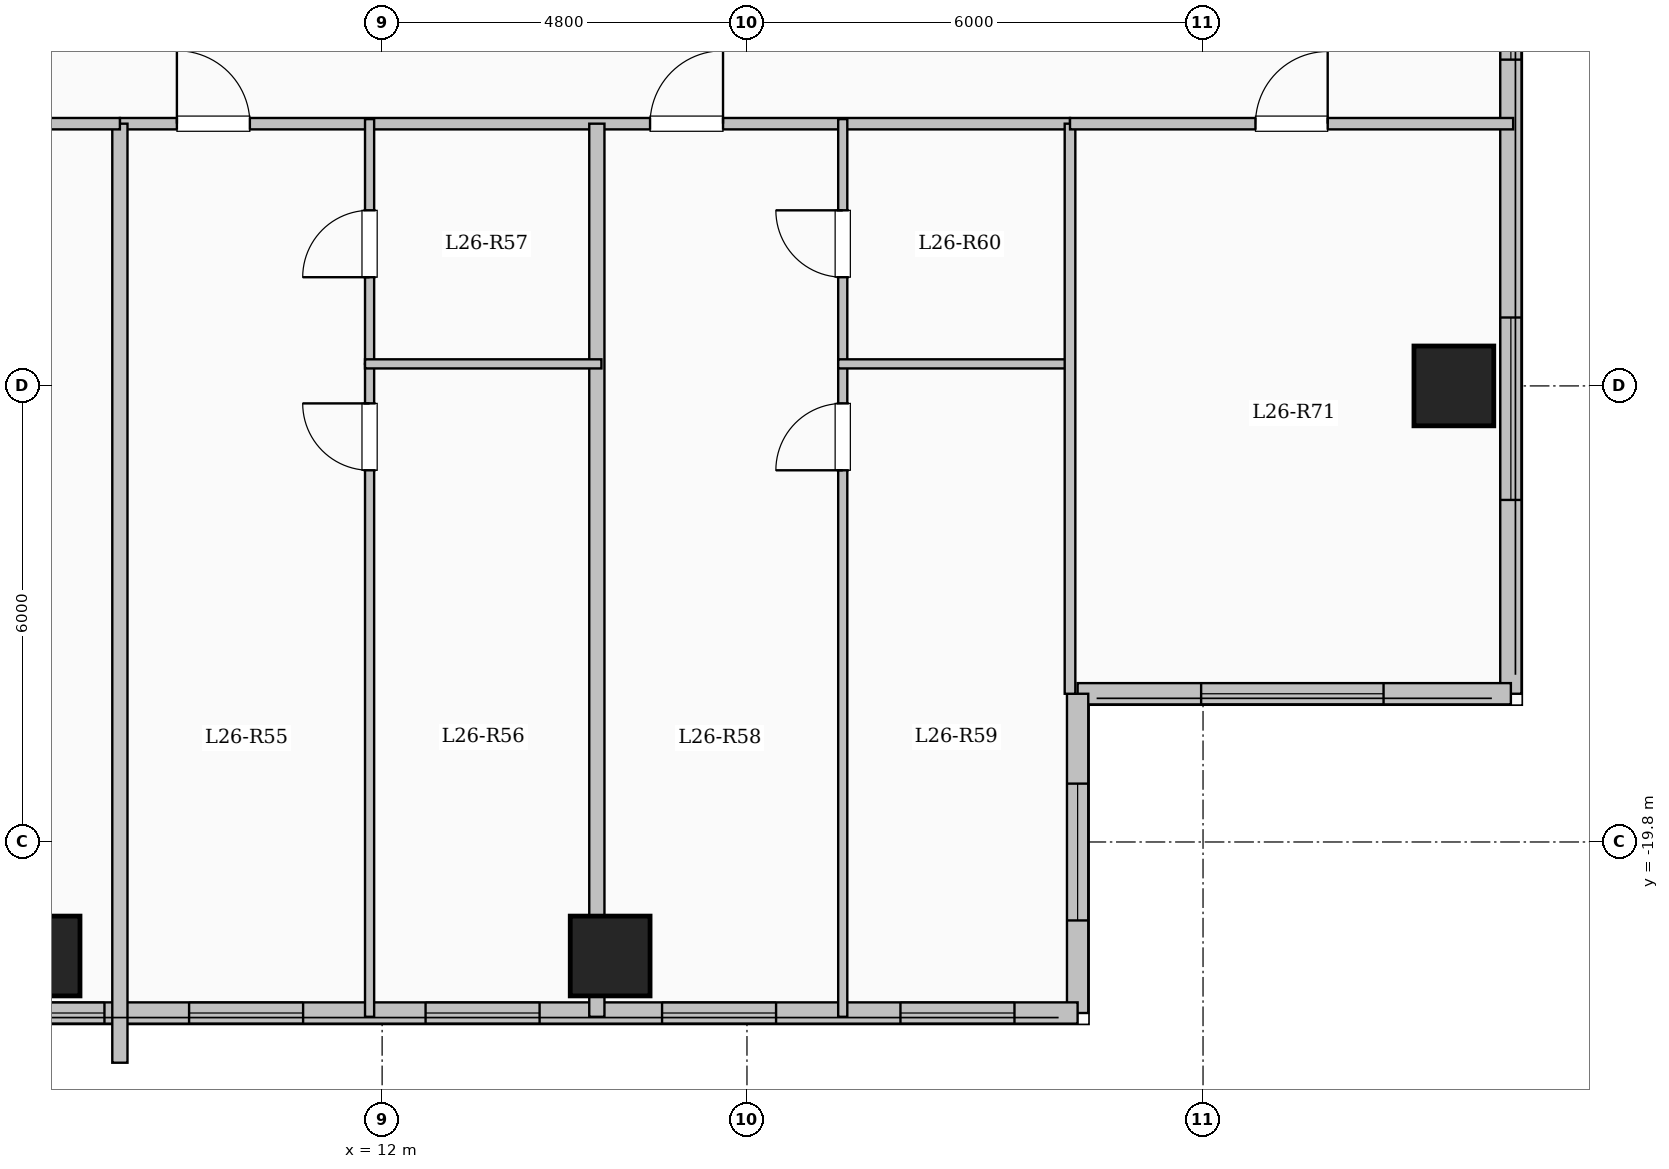
"""IFC4 building model, lengths in metres.
Left out: names, types, materials, properties, quantities, classifications, styles, units other than length and angle.
Written with IfcOpenShell. Run it as: python <this file> out.ifc"""

import sys

from ifc_helpers import new_model, si_unit, direction, frame, frame_2d, origin, origin_2d, place, context, subcontext, project, spatial, rectangle, extrude, element, fill, save


model = new_model("IFC4")
c1 = context("Model", 3, precision=1e-05, world=origin(), true_north=direction((0.0, 1.0)))
c2 = subcontext(c1, "Body", "Model", "MODEL_VIEW")
j1 = project(units=[si_unit("LENGTHUNIT", "METRE"), si_unit("PLANEANGLEUNIT", "RADIAN")], contexts=[c1])
p1 = place(None, origin())
s1 = spatial("IfcSite", under=j1, at=p1, CompositionType="ELEMENT")
p2 = place(p1, origin())
s2 = spatial("IfcBuilding", under=s1, at=p2, CompositionType="ELEMENT")
p3 = place(p2, frame((0.0, 0.0, 98.4)))
s3 = spatial("IfcBuildingStorey", under=s2, at=p3, CompositionType="ELEMENT", Elevation=98.4)
for number, where, z_axis, x_axis in (
    (1, (7.5, -21.3, 0.0), (0.0, 0.0, 1.0), (1.0, 0.0, 0.0)),
    (2, (15.0, -21.3, 0.0), (0.0, 0.0, 1.0), (1.0, 0.0, 0.0)),
    (3, (26.1, -13.8, 0.0), (0.0, 0.0, 1.0), (1.0, 0.0, 0.0)),
):
    element("IfcColumn", number, at=place(p3, frame(where, z_axis=z_axis, x_axis=x_axis)), inside=s3, PredefinedType="COLUMN", context=c2, shape_type="SweptSolid", body=[
        extrude(rectangle(XDim=1.05, YDim=1.05, at=origin_2d()), origin(), (0.0, 0.0, 1.0), 3.35),
    ])
p4 = place(p3, frame((26.85, 17.85, 0.0), z_axis=(0.0, 0.0, 1.0), x_axis=(0.0, -1.0, 0.0)))
e4 = element("IfcWall", 4, at=p4, inside=s3, PredefinedType="SOLIDWALL", context=c2, shape_type="SweptSolid", body=[
    extrude(rectangle(XDim=35.7, YDim=0.28, at=frame_2d((17.85, 0.0))), origin(), (0.0, 0.0, 1.0), 3.1),
])
p5 = place(p4, frame((1.675, 0.0, 0.9)))
e5 = element("IfcOpeningElement", 5, at=p5, cuts=e4, PredefinedType="OPENING", context=c2, shape_type="SweptSolid", body=[
    extrude(rectangle(XDim=2.0, YDim=1.7, at=frame_2d((1.0, 0.85))), frame((0.0, 0.15, 0.0), z_axis=(0.0, -1.0, 0.0), x_axis=(1.0, 0.0, 0.0)), (0.0, 0.0, 1.0), 0.3),
])
p6 = place(p4, frame((5.725, 0.0, 0.95)))
e6 = element("IfcOpeningElement", 6, at=p6, cuts=e4, PredefinedType="OPENING", context=c2, shape_type="SweptSolid", body=[
    extrude(rectangle(XDim=1.0, YDim=1.5, at=frame_2d((0.5, 0.75))), frame((0.0, 0.15, 0.0), z_axis=(0.0, -1.0, 0.0), x_axis=(1.0, 0.0, 0.0)), (0.0, 0.0, 1.0), 0.3),
])
p7 = place(p4, frame((15.1, 0.0, 0.9)))
e7 = element("IfcOpeningElement", 7, at=p7, cuts=e4, PredefinedType="OPENING", context=c2, shape_type="SweptSolid", body=[
    extrude(rectangle(XDim=2.0, YDim=1.7, at=frame_2d((1.0, 0.85))), frame((0.0, 0.15, 0.0), z_axis=(0.0, -1.0, 0.0), x_axis=(1.0, 0.0, 0.0)), (0.0, 0.0, 1.0), 0.3),
])
p8 = place(p4, frame((25.857, 0.0, 0.9)))
e8 = element("IfcOpeningElement", 8, at=p8, cuts=e4, PredefinedType="OPENING", context=c2, shape_type="SweptSolid", body=[
    extrude(rectangle(XDim=1.5, YDim=1.65, at=frame_2d((0.75, 0.825))), frame((0.0, 0.15, 0.0), z_axis=(0.0, -1.0, 0.0), x_axis=(1.0, 0.0, 0.0)), (0.0, 0.0, 1.0), 0.3),
])
p9 = place(p4, frame((30.75, 0.0, 0.9)))
e9 = element("IfcOpeningElement", 9, at=p9, cuts=e4, PredefinedType="OPENING", context=c2, shape_type="SweptSolid", body=[
    extrude(rectangle(XDim=2.4, YDim=1.8, at=frame_2d((1.2, 0.9))), frame((0.0, 0.15, 0.0), z_axis=(0.0, -1.0, 0.0), x_axis=(1.0, 0.0, 0.0)), (0.0, 0.0, 1.0), 0.3),
])
p10 = place(p3, frame((26.85, -17.85, 0.0), z_axis=(0.0, 0.0, 1.0), x_axis=(-1.0, 0.0, 0.0)))
e10 = element("IfcWall", 10, at=p10, inside=s3, PredefinedType="SOLIDWALL", context=c2, shape_type="SweptSolid", body=[
    extrude(rectangle(XDim=5.7, YDim=0.28, at=frame_2d((2.85, 0.0))), origin(), (0.0, 0.0, 1.0), 3.1),
])
p11 = place(p10, frame((1.675, 0.0, 0.9)))
e11 = element("IfcOpeningElement", 11, at=p11, cuts=e10, PredefinedType="OPENING", context=c2, shape_type="SweptSolid", body=[
    extrude(rectangle(XDim=2.4, YDim=1.8, at=frame_2d((1.2, 0.9))), frame((0.0, 0.15, 0.0), z_axis=(0.0, -1.0, 0.0), x_axis=(1.0, 0.0, 0.0)), (0.0, 0.0, 1.0), 0.3),
])
p12 = place(p3, frame((21.15, -17.85, 0.0), z_axis=(0.0, 0.0, 1.0), x_axis=(0.0, -1.0, 0.0)))
e12 = element("IfcWall", 12, at=p12, inside=s3, PredefinedType="SOLIDWALL", context=c2, shape_type="SweptSolid", body=[
    extrude(rectangle(XDim=4.2, YDim=0.28, at=frame_2d((2.1, 0.0))), origin(), (0.0, 0.0, 1.0), 3.1),
])
p13 = place(p12, frame((1.182, 0.0, 0.9)))
e13 = element("IfcOpeningElement", 13, at=p13, cuts=e12, PredefinedType="OPENING", context=c2, shape_type="SweptSolid", body=[
    extrude(rectangle(XDim=1.8, YDim=1.65, at=frame_2d((0.9, 0.825))), frame((0.0, 0.15, 0.0), z_axis=(0.0, -1.0, 0.0), x_axis=(1.0, 0.0, 0.0)), (0.0, 0.0, 1.0), 0.3),
])
p14 = place(p3, frame((21.15, -22.05, 0.0), z_axis=(0.0, 0.0, 1.0), x_axis=(-1.0, 0.0, 0.0)))
e14 = element("IfcWall", 14, at=p14, inside=s3, PredefinedType="SOLIDWALL", context=c2, shape_type="SweptSolid", body=[
    extrude(rectangle(XDim=13.8, YDim=0.28, at=frame_2d((6.9, 0.0))), origin(), (0.0, 0.0, 1.0), 3.1),
])
p15 = place(p14, frame((0.831, 0.0, 0.9)))
e15 = element("IfcOpeningElement", 15, at=p15, cuts=e14, PredefinedType="OPENING", context=c2, shape_type="SweptSolid", body=[
    extrude(rectangle(XDim=1.5, YDim=1.65, at=frame_2d((0.75, 0.825))), frame((0.0, 0.15, 0.0), z_axis=(0.0, -1.0, 0.0), x_axis=(1.0, 0.0, 0.0)), (0.0, 0.0, 1.0), 0.3),
])
p16 = place(p14, frame((3.967, 0.0, 0.9)))
e16 = element("IfcOpeningElement", 16, at=p16, cuts=e14, PredefinedType="OPENING", context=c2, shape_type="SweptSolid", body=[
    extrude(rectangle(XDim=1.5, YDim=1.65, at=frame_2d((0.75, 0.825))), frame((0.0, 0.15, 0.0), z_axis=(0.0, -1.0, 0.0), x_axis=(1.0, 0.0, 0.0)), (0.0, 0.0, 1.0), 0.3),
])
p17 = place(p14, frame((7.078, 0.0, 0.9)))
e17 = element("IfcOpeningElement", 17, at=p17, cuts=e14, PredefinedType="OPENING", context=c2, shape_type="SweptSolid", body=[
    extrude(rectangle(XDim=1.5, YDim=1.65, at=frame_2d((0.75, 0.825))), frame((0.0, 0.15, 0.0), z_axis=(0.0, -1.0, 0.0), x_axis=(1.0, 0.0, 0.0)), (0.0, 0.0, 1.0), 0.3),
])
p18 = place(p14, frame((10.19, 0.0, 0.9)))
e18 = element("IfcOpeningElement", 18, at=p18, cuts=e14, PredefinedType="OPENING", context=c2, shape_type="SweptSolid", body=[
    extrude(rectangle(XDim=1.5, YDim=1.65, at=frame_2d((0.75, 0.825))), frame((0.0, 0.15, 0.0), z_axis=(0.0, -1.0, 0.0), x_axis=(1.0, 0.0, 0.0)), (0.0, 0.0, 1.0), 0.3),
])
p19 = place(p14, frame((12.803, 0.0, 0.95)))
e19 = element("IfcOpeningElement", 19, at=p19, cuts=e14, PredefinedType="OPENING", context=c2, shape_type="SweptSolid", body=[
    extrude(rectangle(XDim=0.85, YDim=1.5, at=frame_2d((0.425, 0.75))), frame((0.0, 0.15, 0.0), z_axis=(0.0, -1.0, 0.0), x_axis=(1.0, 0.0, 0.0)), (0.0, 0.0, 1.0), 0.3),
])
p20 = place(p3, frame((8.55, -10.35, 0.0), z_axis=(0.0, 0.0, 1.0), x_axis=(1.0, 0.0, 0.0)))
e20 = element("IfcWall", 20, at=p20, inside=s3, PredefinedType="PARTITIONING", context=c2, shape_type="SweptSolid", body=[
    extrude(rectangle(XDim=12.5, YDim=0.15, at=frame_2d((6.25, 0.0))), origin(), (0.0, 0.0, 1.0), 3.1),
])
p21 = place(p20, frame((0.75, 0.0, 0.0)))
e21 = element("IfcOpeningElement", 21, at=p21, cuts=e20, PredefinedType="OPENING", context=c2, shape_type="SweptSolid", body=[
    extrude(rectangle(XDim=0.96, YDim=2.15, at=frame_2d((0.48, 1.075))), frame((0.0, 0.085, 0.0), z_axis=(0.0, -1.0, 0.0), x_axis=(1.0, 0.0, 0.0)), (0.0, 0.0, 1.0), 0.17),
])
p22 = place(p20, frame((6.975, 0.0, 0.0)))
e22 = element("IfcOpeningElement", 22, at=p22, cuts=e20, PredefinedType="OPENING", context=c2, shape_type="SweptSolid", body=[
    extrude(rectangle(XDim=0.96, YDim=2.15, at=frame_2d((0.48, 1.075))), frame((0.0, 0.085, 0.0), z_axis=(0.0, -1.0, 0.0), x_axis=(1.0, 0.0, 0.0)), (0.0, 0.0, 1.0), 0.17),
])
p23 = place(p3, frame((14.825, -22.1, 0.0), z_axis=(0.0, 0.0, 1.0), x_axis=(0.0, 1.0, 0.0)))
e23 = element("IfcWall", 23, at=p23, inside=s3, PredefinedType="SOLIDWALL", context=c2, shape_type="SweptSolid", body=[
    extrude(rectangle(XDim=11.75, YDim=0.2, at=frame_2d((5.875, 0.0))), origin(), (0.0, 0.0, 1.0), 2.435),
])
p24 = place(p3, frame((11.835, -22.1, 0.0), z_axis=(0.0, 0.0, 1.0), x_axis=(0.0, 1.0, 0.0)))
e24 = element("IfcWall", 24, at=p24, inside=s3, PredefinedType="PARTITIONING", context=c2, shape_type="SweptSolid", body=[
    extrude(rectangle(XDim=8.59, YDim=0.12, at=frame_2d((4.295, 0.0))), origin(), (0.0, 0.0, 1.0), 3.1),
])
p25 = place(p24, frame((7.19, 0.0, 0.0)))
e25 = element("IfcOpeningElement", 25, at=p25, cuts=e24, PredefinedType="OPENING", context=c2, shape_type="SweptSolid", body=[
    extrude(rectangle(XDim=0.88, YDim=2.1, at=frame_2d((0.44, 1.05))), frame((0.0, 0.07, 0.0), z_axis=(0.0, -1.0, 0.0), x_axis=(1.0, 0.0, 0.0)), (0.0, 0.0, 1.0), 0.14),
])
p26 = place(p3, frame((11.835, -13.51, 0.0), z_axis=(0.0, 0.0, 1.0), x_axis=(0.0, 1.0, 0.0)))
e26 = element("IfcWall", 26, at=p26, inside=s3, PredefinedType="PARTITIONING", context=c2, shape_type="SweptSolid", body=[
    extrude(rectangle(XDim=3.22, YDim=0.12, at=frame_2d((1.61, 0.0))), origin(), (0.0, 0.0, 1.0), 3.1),
])
p27 = place(p26, frame((1.14, 0.0, 0.0)))
e27 = element("IfcOpeningElement", 27, at=p27, cuts=e26, PredefinedType="OPENING", context=c2, shape_type="SweptSolid", body=[
    extrude(rectangle(XDim=0.88, YDim=2.1, at=frame_2d((0.44, 1.05))), frame((0.0, 0.07, 0.0), z_axis=(0.0, -1.0, 0.0), x_axis=(1.0, 0.0, 0.0)), (0.0, 0.0, 1.0), 0.14),
])
p28 = place(p3, frame((11.775, -13.51, 0.0), z_axis=(0.0, 0.0, 1.0), x_axis=(1.0, 0.0, 0.0)))
e28 = element("IfcWall", 28, at=p28, inside=s3, PredefinedType="PARTITIONING", context=c2, shape_type="SweptSolid", body=[
    extrude(rectangle(XDim=3.11, YDim=0.12, at=frame_2d((1.555, 0.0))), origin(), (0.0, 0.0, 1.0), 3.1),
])
p29 = place(p3, frame((18.06, -22.1, 0.0), z_axis=(0.0, 0.0, 1.0), x_axis=(0.0, 1.0, 0.0)))
e29 = element("IfcWall", 29, at=p29, inside=s3, PredefinedType="PARTITIONING", context=c2, shape_type="SweptSolid", body=[
    extrude(rectangle(XDim=8.59, YDim=0.12, at=frame_2d((4.295, 0.0))), origin(), (0.0, 0.0, 1.0), 3.1),
])
p30 = place(p29, frame((7.19, 0.0, 0.0)))
e30 = element("IfcOpeningElement", 30, at=p30, cuts=e29, PredefinedType="OPENING", context=c2, shape_type="SweptSolid", body=[
    extrude(rectangle(XDim=0.88, YDim=2.1, at=frame_2d((0.44, 1.05))), frame((0.0, 0.07, 0.0), z_axis=(0.0, -1.0, 0.0), x_axis=(1.0, 0.0, 0.0)), (0.0, 0.0, 1.0), 0.14),
])
p31 = place(p3, frame((18.06, -13.51, 0.0), z_axis=(0.0, 0.0, 1.0), x_axis=(0.0, 1.0, 0.0)))
e31 = element("IfcWall", 31, at=p31, inside=s3, PredefinedType="PARTITIONING", context=c2, shape_type="SweptSolid", body=[
    extrude(rectangle(XDim=3.22, YDim=0.12, at=frame_2d((1.61, 0.0))), origin(), (0.0, 0.0, 1.0), 3.1),
])
p32 = place(p31, frame((1.14, 0.0, 0.0)))
e32 = element("IfcOpeningElement", 32, at=p32, cuts=e31, PredefinedType="OPENING", context=c2, shape_type="SweptSolid", body=[
    extrude(rectangle(XDim=0.88, YDim=2.1, at=frame_2d((0.44, 1.05))), frame((0.0, 0.07, 0.0), z_axis=(0.0, -1.0, 0.0), x_axis=(1.0, 0.0, 0.0)), (0.0, 0.0, 1.0), 0.14),
])
p33 = place(p3, frame((18.0, -13.51, 0.0), z_axis=(0.0, 0.0, 1.0), x_axis=(1.0, 0.0, 0.0)))
e33 = element("IfcWall", 33, at=p33, inside=s3, PredefinedType="PARTITIONING", context=c2, shape_type="SweptSolid", body=[
    extrude(rectangle(XDim=3.11, YDim=0.12, at=frame_2d((1.555, 0.0))), origin(), (0.0, 0.0, 1.0), 3.1),
])
p34 = place(p3, frame((8.55, -22.704, 0.0), z_axis=(0.0, 0.0, 1.0), x_axis=(0.0, 1.0, 0.0)))
e34 = element("IfcWall", 34, at=p34, inside=s3, PredefinedType="SOLIDWALL", context=c2, shape_type="SweptSolid", body=[
    extrude(rectangle(XDim=12.354, YDim=0.2, at=frame_2d((6.177, 0.0))), origin(), (0.0, 0.0, 1.0), 3.1),
])
p35 = place(p3, frame((-8.55, -10.35, 0.0), z_axis=(0.0, 0.0, 1.0), x_axis=(1.0, 0.0, 0.0)))
e35 = element("IfcWall", 35, at=p35, inside=s3, PredefinedType="PARTITIONING", context=c2, shape_type="SweptSolid", body=[
    extrude(rectangle(XDim=17.1, YDim=0.15, at=frame_2d((8.55, 0.0))), origin(), (0.0, 0.0, 1.0), 3.1),
])
p36 = place(p35, frame((1.6, 0.0, 0.0)))
e36 = element("IfcOpeningElement", 36, at=p36, cuts=e35, PredefinedType="OPENING", context=c2, shape_type="SweptSolid", body=[
    extrude(rectangle(XDim=0.95, YDim=2.15, at=frame_2d((0.475, 1.075))), frame((0.0, 0.085, 0.0), z_axis=(0.0, -1.0, 0.0), x_axis=(1.0, 0.0, 0.0)), (0.0, 0.0, 1.0), 0.17),
])
p37 = place(p35, frame((10.5, 0.0, 0.0)))
e37 = element("IfcOpeningElement", 37, at=p37, cuts=e35, PredefinedType="OPENING", context=c2, shape_type="SweptSolid", body=[
    extrude(rectangle(XDim=0.95, YDim=2.15, at=frame_2d((0.475, 1.075))), frame((0.0, 0.085, 0.0), z_axis=(0.0, -1.0, 0.0), x_axis=(1.0, 0.0, 0.0)), (0.0, 0.0, 1.0), 0.17),
])
p38 = place(p3, frame((21.05, -17.85, 0.0), z_axis=(0.0, 0.0, 1.0), x_axis=(0.0, 1.0, 0.0)))
e38 = element("IfcWall", 38, at=p38, inside=s3, PredefinedType="PARTITIONING", context=c2, shape_type="SweptSolid", body=[
    extrude(rectangle(XDim=7.5, YDim=0.14, at=frame_2d((3.75, 0.0))), origin(), (0.0, 0.0, 1.0), 3.1),
])
p39 = place(p3, frame((21.05, -10.35, 0.0), z_axis=(0.0, 0.0, 1.0), x_axis=(1.0, 0.0, 0.0)))
e39 = element("IfcWall", 39, at=p39, inside=s3, PredefinedType="PARTITIONING", context=c2, shape_type="SweptSolid", body=[
    extrude(rectangle(XDim=5.83, YDim=0.15, at=frame_2d((2.915, 0.0))), origin(), (0.0, 0.0, 1.0), 3.1),
])
p40 = place(p39, frame((2.44, 0.0, 0.0)))
e40 = element("IfcOpeningElement", 40, at=p40, cuts=e39, PredefinedType="OPENING", context=c2, shape_type="SweptSolid", body=[
    extrude(rectangle(XDim=0.95, YDim=2.15, at=frame_2d((0.475, 1.075))), frame((0.0, 0.085, 0.0), z_axis=(0.0, -1.0, 0.0), x_axis=(1.0, 0.0, 0.0)), (0.0, 0.0, 1.0), 0.17),
])
p41 = place(p8, origin())
e41 = element("IfcWindow", 41, at=p41, inside=s3, PartitioningType="SINGLE_PANEL", PredefinedType="WINDOW", context=c2, shape_type="SweptSolid", body=[
    extrude(rectangle(XDim=1.5, YDim=1.65, at=frame_2d((0.75, 0.825))), frame((0.0, 0.03, 0.0), z_axis=(0.0, -1.0, 0.0), x_axis=(1.0, 0.0, 0.0)), (0.0, 0.0, 1.0), 0.06),
])
fill(e8, e41)
p42 = place(p9, origin())
e42 = element("IfcWindow", 42, at=p42, inside=s3, PartitioningType="SINGLE_PANEL", PredefinedType="WINDOW", context=c2, shape_type="SweptSolid", body=[
    extrude(rectangle(XDim=2.4, YDim=1.8, at=frame_2d((1.2, 0.9))), frame((0.0, 0.03, 0.0), z_axis=(0.0, -1.0, 0.0), x_axis=(1.0, 0.0, 0.0)), (0.0, 0.0, 1.0), 0.06),
])
fill(e9, e42)
p43 = place(p11, origin())
e43 = element("IfcWindow", 43, at=p43, inside=s3, PartitioningType="SINGLE_PANEL", PredefinedType="WINDOW", context=c2, shape_type="SweptSolid", body=[
    extrude(rectangle(XDim=2.4, YDim=1.8, at=frame_2d((1.2, 0.9))), frame((0.0, 0.03, 0.0), z_axis=(0.0, -1.0, 0.0), x_axis=(1.0, 0.0, 0.0)), (0.0, 0.0, 1.0), 0.06),
])
fill(e11, e43)
p44 = place(p13, origin())
e44 = element("IfcWindow", 44, at=p44, inside=s3, PartitioningType="SINGLE_PANEL", PredefinedType="WINDOW", context=c2, shape_type="SweptSolid", body=[
    extrude(rectangle(XDim=1.8, YDim=1.65, at=frame_2d((0.9, 0.825))), frame((0.0, 0.03, 0.0), z_axis=(0.0, -1.0, 0.0), x_axis=(1.0, 0.0, 0.0)), (0.0, 0.0, 1.0), 0.06),
])
fill(e13, e44)
p45 = place(p15, origin())
e45 = element("IfcWindow", 45, at=p45, inside=s3, PartitioningType="SINGLE_PANEL", PredefinedType="WINDOW", context=c2, shape_type="SweptSolid", body=[
    extrude(rectangle(XDim=1.5, YDim=1.65, at=frame_2d((0.75, 0.825))), frame((0.0, 0.03, 0.0), z_axis=(0.0, -1.0, 0.0), x_axis=(1.0, 0.0, 0.0)), (0.0, 0.0, 1.0), 0.06),
])
fill(e15, e45)
p46 = place(p16, origin())
e46 = element("IfcWindow", 46, at=p46, inside=s3, PartitioningType="SINGLE_PANEL", PredefinedType="WINDOW", context=c2, shape_type="SweptSolid", body=[
    extrude(rectangle(XDim=1.5, YDim=1.65, at=frame_2d((0.75, 0.825))), frame((0.0, 0.03, 0.0), z_axis=(0.0, -1.0, 0.0), x_axis=(1.0, 0.0, 0.0)), (0.0, 0.0, 1.0), 0.06),
])
fill(e16, e46)
p47 = place(p17, origin())
e47 = element("IfcWindow", 47, at=p47, inside=s3, PartitioningType="SINGLE_PANEL", PredefinedType="WINDOW", context=c2, shape_type="SweptSolid", body=[
    extrude(rectangle(XDim=1.5, YDim=1.65, at=frame_2d((0.75, 0.825))), frame((0.0, 0.03, 0.0), z_axis=(0.0, -1.0, 0.0), x_axis=(1.0, 0.0, 0.0)), (0.0, 0.0, 1.0), 0.06),
])
fill(e17, e47)
p48 = place(p18, origin())
e48 = element("IfcWindow", 48, at=p48, inside=s3, PartitioningType="SINGLE_PANEL", PredefinedType="WINDOW", context=c2, shape_type="SweptSolid", body=[
    extrude(rectangle(XDim=1.5, YDim=1.65, at=frame_2d((0.75, 0.825))), frame((0.0, 0.03, 0.0), z_axis=(0.0, -1.0, 0.0), x_axis=(1.0, 0.0, 0.0)), (0.0, 0.0, 1.0), 0.06),
])
fill(e18, e48)
p49 = place(p19, origin())
e49 = element("IfcWindow", 49, at=p49, inside=s3, PartitioningType="SINGLE_PANEL", PredefinedType="WINDOW", context=c2, shape_type="SweptSolid", body=[
    extrude(rectangle(XDim=0.85, YDim=1.5, at=frame_2d((0.425, 0.75))), frame((0.0, 0.03, 0.0), z_axis=(0.0, -1.0, 0.0), x_axis=(1.0, 0.0, 0.0)), (0.0, 0.0, 1.0), 0.06),
])
fill(e19, e49)
p50 = place(p21, origin())
e50 = element("IfcDoor", 50, at=p50, inside=s3, OperationType="SINGLE_SWING_LEFT", PredefinedType="DOOR", context=c2, shape_type="SweptSolid", body=[
    extrude(rectangle(XDim=0.96, YDim=2.15, at=frame_2d((0.48, 1.075))), frame((0.0, 0.025, 0.0), z_axis=(0.0, -1.0, 0.0), x_axis=(1.0, 0.0, 0.0)), (0.0, 0.0, 1.0), 0.05),
])
fill(e21, e50)
p51 = place(p25, origin())
e51 = element("IfcDoor", 51, at=p51, inside=s3, OperationType="SINGLE_SWING_RIGHT", PredefinedType="DOOR", context=c2, shape_type="SweptSolid", body=[
    extrude(rectangle(XDim=0.88, YDim=2.1, at=frame_2d((0.44, 1.05))), frame((0.0, 0.025, 0.0), z_axis=(0.0, -1.0, 0.0), x_axis=(1.0, 0.0, 0.0)), (0.0, 0.0, 1.0), 0.05),
])
fill(e25, e51)
p52 = place(p27, origin())
e52 = element("IfcDoor", 52, at=p52, inside=s3, OperationType="SINGLE_SWING_LEFT", PredefinedType="DOOR", context=c2, shape_type="SweptSolid", body=[
    extrude(rectangle(XDim=0.88, YDim=2.1, at=frame_2d((0.44, 1.05))), frame((0.0, 0.025, 0.0), z_axis=(0.0, -1.0, 0.0), x_axis=(1.0, 0.0, 0.0)), (0.0, 0.0, 1.0), 0.05),
])
fill(e27, e52)
p53 = place(p22, origin())
e53 = element("IfcDoor", 53, at=p53, inside=s3, OperationType="SINGLE_SWING_RIGHT", PredefinedType="DOOR", context=c2, shape_type="SweptSolid", body=[
    extrude(rectangle(XDim=0.96, YDim=2.15, at=frame_2d((0.48, 1.075))), frame((0.0, 0.025, 0.0), z_axis=(0.0, -1.0, 0.0), x_axis=(1.0, 0.0, 0.0)), (0.0, 0.0, 1.0), 0.05),
])
fill(e22, e53)
p54 = place(p30, origin())
e54 = element("IfcDoor", 54, at=p54, inside=s3, OperationType="SINGLE_SWING_LEFT", PredefinedType="DOOR", context=c2, shape_type="SweptSolid", body=[
    extrude(rectangle(XDim=0.88, YDim=2.1, at=frame_2d((0.44, 1.05))), frame((0.0, 0.025, 0.0), z_axis=(0.0, -1.0, 0.0), x_axis=(1.0, 0.0, 0.0)), (0.0, 0.0, 1.0), 0.05),
])
fill(e30, e54)
p55 = place(p32, origin())
e55 = element("IfcDoor", 55, at=p55, inside=s3, OperationType="SINGLE_SWING_RIGHT", PredefinedType="DOOR", context=c2, shape_type="SweptSolid", body=[
    extrude(rectangle(XDim=0.88, YDim=2.1, at=frame_2d((0.44, 1.05))), frame((0.0, 0.025, 0.0), z_axis=(0.0, -1.0, 0.0), x_axis=(1.0, 0.0, 0.0)), (0.0, 0.0, 1.0), 0.05),
])
fill(e32, e55)
p56 = place(p40, origin())
e56 = element("IfcDoor", 56, at=p56, inside=s3, OperationType="SINGLE_SWING_RIGHT", PredefinedType="DOOR", context=c2, shape_type="SweptSolid", body=[
    extrude(rectangle(XDim=0.95, YDim=2.15, at=frame_2d((0.475, 1.075))), frame((0.0, 0.025, 0.0), z_axis=(0.0, -1.0, 0.0), x_axis=(1.0, 0.0, 0.0)), (0.0, 0.0, 1.0), 0.05),
])
fill(e40, e56)
save(model, sys.argv[1])
